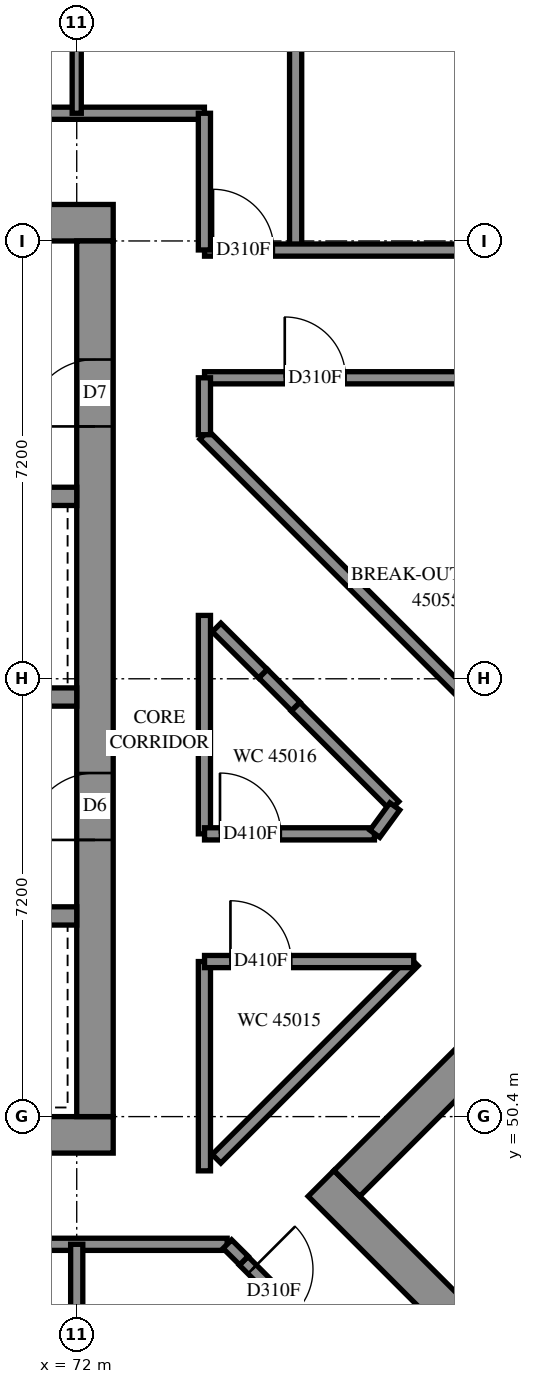
"""IFC4 building model, lengths in metres.
Left out: names, types, materials, properties, quantities, classifications, styles, units other than length and angle.
Written with IfcOpenShell. Run it as: python <this file> out.ifc"""

import sys

from ifc_helpers import new_model, si_unit, direction, frame, frame_2d, origin, place, context, subcontext, project, spatial, rectangle, extrude, element, fill, save


model = new_model("IFC4")
c1 = context("Model", 3, precision=1e-05, world=origin(), true_north=direction((0.0, 1.0)))
c2 = subcontext(c1, "Body", "Model", "MODEL_VIEW")
j1 = project(units=[si_unit("LENGTHUNIT", "METRE"), si_unit("PLANEANGLEUNIT", "RADIAN")], contexts=[c1])
p1 = place(None, origin())
s1 = spatial("IfcSite", under=j1, at=p1, CompositionType="ELEMENT")
p2 = place(p1, origin())
s2 = spatial("IfcBuilding", under=s1, at=p2, CompositionType="ELEMENT")
p3 = place(p2, frame((0.0, 0.0, 166.0)))
s3 = spatial("IfcBuildingStorey", under=s2, at=p3, CompositionType="ELEMENT", Elevation=166.0)
p4 = place(p3, frame((57.0, 50.1, -0.3), z_axis=(0.0, 0.0, 1.0), x_axis=(1.0, 0.0, 0.0)))
e1 = element("IfcWall", 1, at=p4, inside=s3, PredefinedType="SHEAR", context=c2, shape_type="SweptSolid", body=[
    extrude(rectangle(XDim=15.6, YDim=0.6, at=frame_2d((7.8, 0.0))), origin(), (0.0, 0.0, 1.0), 2.7),
])
p5 = place(p3, frame((57.0, 65.1, -0.3), z_axis=(0.0, 0.0, 1.0), x_axis=(1.0, 0.0, 0.0)))
e2 = element("IfcWall", 2, at=p5, inside=s3, PredefinedType="SHEAR", context=c2, shape_type="SweptSolid", body=[
    extrude(rectangle(XDim=15.6, YDim=0.6, at=frame_2d((7.8, 0.0))), origin(), (0.0, 0.0, 1.0), 2.7),
])
p6 = place(p5, frame((10.6, 0.0, 0.3)))
e3 = element("IfcOpeningElement", 3, at=p6, cuts=e2, PredefinedType="OPENING", context=c2, shape_type="SweptSolid", body=[
    extrude(rectangle(XDim=0.8, YDim=2.1, at=frame_2d((0.4, 1.05))), frame((0.0, 0.31, 0.0), z_axis=(0.0, -1.0, 0.0), x_axis=(1.0, 0.0, 0.0)), (0.0, 0.0, 1.0), 0.62),
])
p7 = place(p3, frame((72.3, 50.4, -0.3), z_axis=(0.0, 0.0, 1.0), x_axis=(0.0, 1.0, 0.0)))
e4 = element("IfcWall", 4, at=p7, inside=s3, PredefinedType="SHEAR", context=c2, shape_type="SweptSolid", body=[
    extrude(rectangle(XDim=14.4, YDim=0.6, at=frame_2d((7.2, 0.0))), origin(), (0.0, 0.0, 1.0), 2.7),
])
p8 = place(p7, frame((4.55, 0.0, 0.3)))
e5 = element("IfcOpeningElement", 5, at=p8, cuts=e4, PredefinedType="OPENING", context=c2, shape_type="SweptSolid", body=[
    extrude(rectangle(XDim=1.1, YDim=2.1, at=frame_2d((0.55, 1.05))), frame((0.0, 0.31, 0.0), z_axis=(0.0, -1.0, 0.0), x_axis=(1.0, 0.0, 0.0)), (0.0, 0.0, 1.0), 0.62),
])
p9 = place(p7, frame((11.35, 0.0, 0.3)))
e6 = element("IfcOpeningElement", 6, at=p9, cuts=e4, PredefinedType="OPENING", context=c2, shape_type="SweptSolid", body=[
    extrude(rectangle(XDim=1.1, YDim=2.1, at=frame_2d((0.55, 1.05))), frame((0.0, 0.31, 0.0), z_axis=(0.0, -1.0, 0.0), x_axis=(1.0, 0.0, 0.0)), (0.0, 0.0, 1.0), 0.62),
])
p10 = place(p3, frame((57.6, 53.7, 0.0), z_axis=(0.0, 0.0, 1.0), x_axis=(1.0, 0.0, 0.0)))
e7 = element("IfcWall", 7, at=p10, inside=s3, PredefinedType="SOLIDWALL", context=c2, shape_type="SweptSolid", body=[
    extrude(rectangle(XDim=14.4, YDim=0.3, at=frame_2d((7.2, 0.0))), origin(), (0.0, 0.0, 1.0), 3.1),
])
p11 = place(p10, frame((1.35, 0.0, 0.0)))
e8 = element("IfcOpeningElement", 8, at=p11, cuts=e7, PredefinedType="OPENING", context=c2, shape_type="SweptSolid", body=[
    extrude(rectangle(XDim=0.9, YDim=2.1, at=frame_2d((0.45, 1.05))), frame((0.0, 0.16, 0.0), z_axis=(0.0, -1.0, 0.0), x_axis=(1.0, 0.0, 0.0)), (0.0, 0.0, 1.0), 0.32),
])
p12 = place(p10, frame((4.95, 0.0, 0.0)))
e9 = element("IfcOpeningElement", 9, at=p12, cuts=e7, PredefinedType="OPENING", context=c2, shape_type="SweptSolid", body=[
    extrude(rectangle(XDim=0.9, YDim=2.1, at=frame_2d((0.45, 1.05))), frame((0.0, 0.16, 0.0), z_axis=(0.0, -1.0, 0.0), x_axis=(1.0, 0.0, 0.0)), (0.0, 0.0, 1.0), 0.32),
])
p13 = place(p10, frame((8.55, 0.0, 0.0)))
e10 = element("IfcOpeningElement", 10, at=p13, cuts=e7, PredefinedType="OPENING", context=c2, shape_type="SweptSolid", body=[
    extrude(rectangle(XDim=0.9, YDim=2.1, at=frame_2d((0.45, 1.05))), frame((0.0, 0.16, 0.0), z_axis=(0.0, -1.0, 0.0), x_axis=(1.0, 0.0, 0.0)), (0.0, 0.0, 1.0), 0.32),
])
p14 = place(p10, frame((12.05, 0.0, 0.0)))
e11 = element("IfcOpeningElement", 11, at=p14, cuts=e7, PredefinedType="OPENING", context=c2, shape_type="SweptSolid", body=[
    extrude(rectangle(XDim=1.1, YDim=2.1, at=frame_2d((0.55, 1.05))), frame((0.0, 0.16, 0.0), z_axis=(0.0, -1.0, 0.0), x_axis=(1.0, 0.0, 0.0)), (0.0, 0.0, 1.0), 0.32),
])
p15 = place(p3, frame((57.6, 57.3, 0.0), z_axis=(0.0, 0.0, 1.0), x_axis=(1.0, 0.0, 0.0)))
e12 = element("IfcWall", 12, at=p15, inside=s3, PredefinedType="SOLIDWALL", context=c2, shape_type="SweptSolid", body=[
    extrude(rectangle(XDim=14.4, YDim=0.3, at=frame_2d((7.2, 0.0))), origin(), (0.0, 0.0, 1.0), 3.1),
])
p16 = place(p15, frame((1.25, 0.0, 0.0)))
e13 = element("IfcOpeningElement", 13, at=p16, cuts=e12, PredefinedType="OPENING", context=c2, shape_type="SweptSolid", body=[
    extrude(rectangle(XDim=1.1, YDim=2.1, at=frame_2d((0.55, 1.05))), frame((0.0, 0.16, 0.0), z_axis=(0.0, -1.0, 0.0), x_axis=(1.0, 0.0, 0.0)), (0.0, 0.0, 1.0), 0.32),
])
p17 = place(p15, frame((4.85, 0.0, 0.0)))
e14 = element("IfcOpeningElement", 14, at=p17, cuts=e12, PredefinedType="OPENING", context=c2, shape_type="SweptSolid", body=[
    extrude(rectangle(XDim=1.1, YDim=2.1, at=frame_2d((0.55, 1.05))), frame((0.0, 0.16, 0.0), z_axis=(0.0, -1.0, 0.0), x_axis=(1.0, 0.0, 0.0)), (0.0, 0.0, 1.0), 0.32),
])
p18 = place(p15, frame((8.45, 0.0, 0.0)))
e15 = element("IfcOpeningElement", 15, at=p18, cuts=e12, PredefinedType="OPENING", context=c2, shape_type="SweptSolid", body=[
    extrude(rectangle(XDim=1.1, YDim=2.1, at=frame_2d((0.55, 1.05))), frame((0.0, 0.16, 0.0), z_axis=(0.0, -1.0, 0.0), x_axis=(1.0, 0.0, 0.0)), (0.0, 0.0, 1.0), 0.32),
])
p19 = place(p15, frame((12.05, 0.0, 0.0)))
e16 = element("IfcOpeningElement", 16, at=p19, cuts=e12, PredefinedType="OPENING", context=c2, shape_type="SweptSolid", body=[
    extrude(rectangle(XDim=1.1, YDim=2.1, at=frame_2d((0.55, 1.05))), frame((0.0, 0.16, 0.0), z_axis=(0.0, -1.0, 0.0), x_axis=(1.0, 0.0, 0.0)), (0.0, 0.0, 1.0), 0.32),
])
p20 = place(p3, frame((64.8, 60.6, 0.0), z_axis=(0.0, 0.0, 1.0), x_axis=(1.0, 0.0, 0.0)))
e17 = element("IfcWall", 17, at=p20, inside=s3, PredefinedType="SOLIDWALL", context=c2, shape_type="SweptSolid", body=[
    extrude(rectangle(XDim=7.2, YDim=0.3, at=frame_2d((3.6, 0.0))), origin(), (0.0, 0.0, 1.0), 3.1),
])
p21 = place(p3, frame((76.018, 49.302, -0.3), z_axis=(0.0, 0.0, 1.0), x_axis=(0.7071067812, -0.7071067812, 0.0)))
e18 = element("IfcWall", 18, at=p21, inside=s3, PredefinedType="SHEAR", context=c2, shape_type="SweptSolid", body=[
    extrude(rectangle(XDim=15.6, YDim=0.6, at=frame_2d((7.8, 0.0))), origin(), (0.0, 0.0, 1.0), 2.7),
])
p22 = place(p3, frame((76.442, 49.302, -0.3), z_axis=(0.0, 0.0, 1.0), x_axis=(0.7071067812, 0.7071067812, 0.0)))
e19 = element("IfcWall", 19, at=p22, inside=s3, PredefinedType="SHEAR", context=c2, shape_type="SweptSolid", body=[
    extrude(rectangle(XDim=14.4, YDim=0.6, at=frame_2d((7.2, 0.0))), origin(), (0.0, 0.0, 1.0), 2.7),
])
p23 = place(p22, frame((4.55, 0.0, 0.3)))
e20 = element("IfcOpeningElement", 20, at=p23, cuts=e19, PredefinedType="OPENING", context=c2, shape_type="SweptSolid", body=[
    extrude(rectangle(XDim=1.1, YDim=2.1, at=frame_2d((0.55, 1.05))), frame((0.0, 0.31, 0.0), z_axis=(0.0, -1.0, 0.0), x_axis=(1.0, 0.0, 0.0)), (0.0, 0.0, 1.0), 0.62),
])
p24 = place(p22, frame((11.35, 0.0, 0.3)))
e21 = element("IfcOpeningElement", 21, at=p24, cuts=e19, PredefinedType="OPENING", context=c2, shape_type="SweptSolid", body=[
    extrude(rectangle(XDim=1.1, YDim=2.1, at=frame_2d((0.55, 1.05))), frame((0.0, 0.31, 0.0), z_axis=(0.0, -1.0, 0.0), x_axis=(1.0, 0.0, 0.0)), (0.0, 0.0, 1.0), 0.62),
])
p25 = place(p3, frame((55.5, 48.3, 0.0), z_axis=(0.0, 0.0, 1.0), x_axis=(1.0, 0.0, 0.0)))
e22 = element("IfcWall", 22, at=p25, inside=s3, PredefinedType="PARTITIONING", context=c2, shape_type="SweptSolid", body=[
    extrude(rectangle(XDim=18.974, YDim=0.2, at=frame_2d((9.487, 0.0))), origin(), (0.0, 0.0, 1.0), 3.1),
])
p26 = place(p25, frame((5.963, 0.0, 0.0)))
e23 = element("IfcOpeningElement", 23, at=p26, cuts=e22, PredefinedType="OPENING", context=c2, shape_type="SweptSolid", body=[
    extrude(rectangle(XDim=1.0, YDim=2.1, at=frame_2d((0.5, 1.05))), frame((0.0, 0.11, 0.0), z_axis=(0.0, -1.0, 0.0), x_axis=(1.0, 0.0, 0.0)), (0.0, 0.0, 1.0), 0.22),
])
p27 = place(p25, frame((13.161, 0.0, 0.0)))
e24 = element("IfcOpeningElement", 24, at=p27, cuts=e22, PredefinedType="OPENING", context=c2, shape_type="SweptSolid", body=[
    extrude(rectangle(XDim=0.9, YDim=2.1, at=frame_2d((0.45, 1.05))), frame((0.0, 0.11, 0.0), z_axis=(0.0, -1.0, 0.0), x_axis=(1.0, 0.0, 0.0)), (0.0, 0.0, 1.0), 0.22),
])
p28 = place(p3, frame((55.5, 66.9, 0.0), z_axis=(0.0, 0.0, 1.0), x_axis=(1.0, 0.0, 0.0)))
e25 = element("IfcWall", 25, at=p28, inside=s3, PredefinedType="PARTITIONING", context=c2, shape_type="SweptSolid", body=[
    extrude(rectangle(XDim=18.6, YDim=0.2, at=frame_2d((9.3, 0.0))), origin(), (0.0, 0.0, 1.0), 3.1),
])
p29 = place(p28, frame((4.45, 0.0, 0.0)))
e26 = element("IfcOpeningElement", 26, at=p29, cuts=e25, PredefinedType="OPENING", context=c2, shape_type="SweptSolid", body=[
    extrude(rectangle(XDim=0.9, YDim=2.1, at=frame_2d((0.45, 1.05))), frame((0.0, 0.11, 0.0), z_axis=(0.0, -1.0, 0.0), x_axis=(1.0, 0.0, 0.0)), (0.0, 0.0, 1.0), 0.22),
])
p30 = place(p28, frame((6.1, 0.0, 0.0)))
e27 = element("IfcOpeningElement", 27, at=p30, cuts=e25, PredefinedType="OPENING", context=c2, shape_type="SweptSolid", body=[
    extrude(rectangle(XDim=0.9, YDim=2.1, at=frame_2d((0.45, 1.05))), frame((0.0, 0.11, 0.0), z_axis=(0.0, -1.0, 0.0), x_axis=(1.0, 0.0, 0.0)), (0.0, 0.0, 1.0), 0.22),
])
p31 = place(p28, frame((11.65, 0.0, 0.0)))
e28 = element("IfcOpeningElement", 28, at=p31, cuts=e25, PredefinedType="OPENING", context=c2, shape_type="SweptSolid", body=[
    extrude(rectangle(XDim=0.9, YDim=2.1, at=frame_2d((0.45, 1.05))), frame((0.0, 0.11, 0.0), z_axis=(0.0, -1.0, 0.0), x_axis=(1.0, 0.0, 0.0)), (0.0, 0.0, 1.0), 0.22),
])
p32 = place(p28, frame((13.3, 0.0, 0.0)))
e29 = element("IfcOpeningElement", 29, at=p32, cuts=e25, PredefinedType="OPENING", context=c2, shape_type="SweptSolid", body=[
    extrude(rectangle(XDim=0.9, YDim=2.1, at=frame_2d((0.45, 1.05))), frame((0.0, 0.11, 0.0), z_axis=(0.0, -1.0, 0.0), x_axis=(1.0, 0.0, 0.0)), (0.0, 0.0, 1.0), 0.22),
])
p33 = place(p3, frame((75.6, 64.65, 0.0), z_axis=(0.0, 0.0, 1.0), x_axis=(0.0, 1.0, 0.0)))
e30 = element("IfcWall", 30, at=p33, inside=s3, PredefinedType="PARTITIONING", context=c2, shape_type="SweptSolid", body=[
    extrude(rectangle(XDim=8.16, YDim=0.2, at=frame_2d((4.08, 0.0))), origin(), (0.0, 0.0, 1.0), 3.1),
])
p34 = place(p3, frame((74.097, 61.611, 0.0), z_axis=(0.0, 0.0, 1.0), x_axis=(0.7071067812, -0.7071067812, 0.0)))
e31 = element("IfcWall", 31, at=p34, inside=s3, PredefinedType="PARTITIONING", context=c2, shape_type="SweptSolid", body=[
    extrude(rectangle(XDim=8.061, YDim=0.2, at=frame_2d((4.03, 0.0))), origin(), (0.0, 0.0, 1.0), 3.1),
])
p35 = place(p3, frame((74.102, 62.55, 0.0), z_axis=(0.0, 0.0, 1.0), x_axis=(1.0, 0.0, 0.0)))
e32 = element("IfcWall", 32, at=p35, inside=s3, PredefinedType="PARTITIONING", context=c2, shape_type="SweptSolid", body=[
    extrude(rectangle(XDim=5.098, YDim=0.2, at=frame_2d((2.549, 0.0))), origin(), (0.0, 0.0, 1.0), 3.1),
])
p36 = place(p35, frame((1.319, 0.0, 0.0)))
e33 = element("IfcOpeningElement", 33, at=p36, cuts=e32, PredefinedType="OPENING", context=c2, shape_type="SweptSolid", body=[
    extrude(rectangle(XDim=1.0, YDim=2.1, at=frame_2d((0.5, 1.05))), frame((0.0, 0.11, 0.0), z_axis=(0.0, -1.0, 0.0), x_axis=(1.0, 0.0, 0.0)), (0.0, 0.0, 1.0), 0.22),
])
p37 = place(p3, frame((72.0, 43.65, 0.0), z_axis=(0.0, 0.0, 1.0), x_axis=(0.0, 1.0, 0.0)))
e34 = element("IfcWall", 34, at=p37, inside=s3, PredefinedType="PARTITIONING", context=c2, shape_type="SweptSolid", body=[
    extrude(rectangle(XDim=4.65, YDim=0.2, at=frame_2d((2.325, 0.0))), origin(), (0.0, 0.0, 1.0), 3.1),
])
p38 = place(p3, frame((74.102, 64.65, 0.0), z_axis=(0.0, 0.0, 1.0), x_axis=(1.0, 0.0, 0.0)))
e35 = element("IfcWall", 35, at=p38, inside=s3, PredefinedType="PARTITIONING", context=c2, shape_type="SweptSolid", body=[
    extrude(rectangle(XDim=4.648, YDim=0.2, at=frame_2d((2.324, 0.0))), origin(), (0.0, 0.0, 1.0), 3.1),
])
p39 = place(p38, frame((0.14, 0.0, 0.0)))
e36 = element("IfcOpeningElement", 36, at=p39, cuts=e35, PredefinedType="OPENING", context=c2, shape_type="SweptSolid", body=[
    extrude(rectangle(XDim=1.0, YDim=2.1, at=frame_2d((0.5, 1.05))), frame((0.0, 0.11, 0.0), z_axis=(0.0, -1.0, 0.0), x_axis=(1.0, 0.0, 0.0)), (0.0, 0.0, 1.0), 0.22),
])
p40 = place(p3, frame((74.3, 49.706, 0.0), z_axis=(0.0, 0.0, 1.0), x_axis=(0.7071067812, 0.7071067812, 0.0)))
e37 = element("IfcWall", 37, at=p40, inside=s3, PredefinedType="PARTITIONING", context=c2, shape_type="SweptSolid", body=[
    extrude(rectangle(XDim=4.588, YDim=0.2, at=frame_2d((2.294, 0.0))), origin(), (0.0, 0.0, 1.0), 3.1),
])
p41 = place(p3, frame((74.745, 48.029, 0.0), z_axis=(0.0, 0.0, 1.0), x_axis=(0.7068806156, -0.7073328745, 0.0)))
e38 = element("IfcWall", 38, at=p41, inside=s3, PredefinedType="PARTITIONING", context=c2, shape_type="SweptSolid", body=[
    extrude(rectangle(XDim=4.422, YDim=0.2, at=frame_2d((2.211, 0.0))), origin(), (0.0, 0.0, 1.0), 3.1),
])
p42 = place(p41, frame((0.199, 0.0, 0.0)))
e39 = element("IfcOpeningElement", 39, at=p42, cuts=e38, PredefinedType="OPENING", context=c2, shape_type="SweptSolid", body=[
    extrude(rectangle(XDim=1.0, YDim=2.1, at=frame_2d((0.5, 1.05))), frame((0.0, 0.11, 0.0), z_axis=(0.0, -1.0, 0.0), x_axis=(1.0, 0.0, 0.0)), (0.0, 0.0, 1.0), 0.22),
])
p43 = place(p3, frame((74.1, 55.05, 0.0), z_axis=(0.0, 0.0, 1.0), x_axis=(0.0, 1.0, 0.0)))
e40 = element("IfcWall", 40, at=p43, inside=s3, PredefinedType="PARTITIONING", context=c2, shape_type="SweptSolid", body=[
    extrude(rectangle(XDim=3.592, YDim=0.2, at=frame_2d((1.796, 0.0))), origin(), (0.0, 0.0, 1.0), 3.1),
])
p44 = place(p3, frame((74.1, 49.508, 0.0), z_axis=(0.0, 0.0, 1.0), x_axis=(0.0, 1.0, 0.0)))
e41 = element("IfcWall", 41, at=p44, inside=s3, PredefinedType="PARTITIONING", context=c2, shape_type="SweptSolid", body=[
    extrude(rectangle(XDim=3.442, YDim=0.2, at=frame_2d((1.721, 0.0))), origin(), (0.0, 0.0, 1.0), 3.1),
])
p45 = place(p3, frame((74.102, 52.95, 0.0), z_axis=(0.0, 0.0, 1.0), x_axis=(1.0, 0.0, 0.0)))
e42 = element("IfcWall", 42, at=p45, inside=s3, PredefinedType="PARTITIONING", context=c2, shape_type="SweptSolid", body=[
    extrude(rectangle(XDim=3.44, YDim=0.2, at=frame_2d((1.72, 0.0))), origin(), (0.0, 0.0, 1.0), 3.1),
])
p46 = place(p45, frame((0.426, 0.0, 0.0)))
e43 = element("IfcOpeningElement", 43, at=p46, cuts=e42, PredefinedType="OPENING", context=c2, shape_type="SweptSolid", body=[
    extrude(rectangle(XDim=1.0, YDim=2.1, at=frame_2d((0.5, 1.05))), frame((0.0, 0.11, 0.0), z_axis=(0.0, -1.0, 0.0), x_axis=(1.0, 0.0, 0.0)), (0.0, 0.0, 1.0), 0.22),
])
p47 = place(p3, frame((74.102, 55.05, 0.0), z_axis=(0.0, 0.0, 1.0), x_axis=(1.0, 0.0, 0.0)))
e44 = element("IfcWall", 44, at=p47, inside=s3, PredefinedType="PARTITIONING", context=c2, shape_type="SweptSolid", body=[
    extrude(rectangle(XDim=2.794, YDim=0.2, at=frame_2d((1.397, 0.0))), origin(), (0.0, 0.0, 1.0), 3.1),
])
p48 = place(p47, frame((0.254, 0.0, 0.0)))
e45 = element("IfcOpeningElement", 45, at=p48, cuts=e44, PredefinedType="OPENING", context=c2, shape_type="SweptSolid", body=[
    extrude(rectangle(XDim=1.0, YDim=2.1, at=frame_2d((0.5, 1.05))), frame((0.0, 0.11, 0.0), z_axis=(0.0, -1.0, 0.0), x_axis=(1.0, 0.0, 0.0)), (0.0, 0.0, 1.0), 0.22),
])
p49 = place(p3, frame((72.0, 66.9, 0.0), z_axis=(0.0, 0.0, 1.0), x_axis=(0.0, 1.0, 0.0)))
e46 = element("IfcWall", 46, at=p49, inside=s3, PredefinedType="PARTITIONING", context=c2, shape_type="SweptSolid", body=[
    extrude(rectangle(XDim=2.4, YDim=0.15, at=frame_2d((1.2, 0.0))), origin(), (0.0, 0.0, 1.0), 3.1),
])
p50 = place(p3, frame((75.597, 57.141, 0.0), z_axis=(0.0, 0.0, 1.0), x_axis=(0.7071067812, -0.7071067812, 0.0)))
e47 = element("IfcWall", 47, at=p50, inside=s3, PredefinedType="PARTITIONING", context=c2, shape_type="SweptSolid", body=[
    extrude(rectangle(XDim=2.305, YDim=0.2, at=frame_2d((1.153, 0.0))), origin(), (0.0, 0.0, 1.0), 3.1),
])
p51 = place(p3, frame((74.1, 64.652, 0.0), z_axis=(0.0, 0.0, 1.0), x_axis=(0.0, 1.0, 0.0)))
e48 = element("IfcWall", 48, at=p51, inside=s3, PredefinedType="PARTITIONING", context=c2, shape_type="SweptSolid", body=[
    extrude(rectangle(XDim=2.248, YDim=0.2, at=frame_2d((1.124, 0.0))), origin(), (0.0, 0.0, 1.0), 3.1),
])
p52 = place(p3, frame((74.3, 58.444, 0.0), z_axis=(0.0, 0.0, 1.0), x_axis=(0.7080329185, -0.7061794292, 0.0)))
e49 = element("IfcWall", 49, at=p52, inside=s3, PredefinedType="PARTITIONING", context=c2, shape_type="SweptSolid", body=[
    extrude(rectangle(XDim=1.079, YDim=0.2, at=frame_2d((0.539, 0.0))), origin(), (0.0, 0.0, 1.0), 3.1),
])
p53 = place(p3, frame((74.1, 61.614, 0.0), z_axis=(0.0, 0.0, 1.0), x_axis=(0.0, 1.0, 0.0)))
e50 = element("IfcWall", 50, at=p53, inside=s3, PredefinedType="PARTITIONING", context=c2, shape_type="SweptSolid", body=[
    extrude(rectangle(XDim=0.936, YDim=0.2, at=frame_2d((0.468, 0.0))), origin(), (0.0, 0.0, 1.0), 3.1),
])
p54 = place(p3, frame((75.065, 57.683, 0.0), z_axis=(0.0, 0.0, 1.0), x_axis=(0.705788785, -0.7084223253, 0.0)))
e51 = element("IfcWall", 51, at=p54, inside=s3, PredefinedType="PARTITIONING", context=c2, shape_type="SweptSolid", body=[
    extrude(rectangle(XDim=0.759, YDim=0.2, at=frame_2d((0.38, 0.0))), origin(), (0.0, 0.0, 1.0), 3.1),
])
p55 = place(p3, frame((76.903, 55.051, 0.0), z_axis=(0.0, 0.0, 1.0), x_axis=(0.5890255926, 0.8081143801, 0.0)))
e52 = element("IfcWall", 52, at=p55, inside=s3, PredefinedType="PARTITIONING", context=c2, shape_type="SweptSolid", body=[
    extrude(rectangle(XDim=0.557, YDim=0.2, at=frame_2d((0.278, 0.0))), origin(), (0.0, 0.0, 1.0), 3.1),
])
p56 = place(p3, frame((74.477, 48.303, 0.0), z_axis=(0.0, 0.0, 1.0), x_axis=(0.7097111995, -0.7044927348, 0.0)))
e53 = element("IfcWall", 53, at=p56, inside=s3, PredefinedType="PARTITIONING", context=c2, shape_type="SweptSolid", body=[
    extrude(rectangle(XDim=0.383, YDim=0.2, at=frame_2d((0.192, 0.0))), origin(), (0.0, 0.0, 1.0), 3.1),
])
p57 = place(p8, origin())
e54 = element("IfcDoor", 54, at=p57, inside=s3, OperationType="DOUBLE_DOOR_SINGLE_SWING", PredefinedType="DOOR", context=c2, shape_type="SweptSolid", body=[
    extrude(rectangle(XDim=1.1, YDim=2.1, at=frame_2d((0.55, 1.05))), frame((0.0, 0.025, 0.0), z_axis=(0.0, -1.0, 0.0), x_axis=(1.0, 0.0, 0.0)), (0.0, 0.0, 1.0), 0.05),
])
fill(e5, e54)
p58 = place(p9, origin())
e55 = element("IfcDoor", 55, at=p58, inside=s3, OperationType="SINGLE_SWING_RIGHT", PredefinedType="DOOR", context=c2, shape_type="SweptSolid", body=[
    extrude(rectangle(XDim=1.1, YDim=2.1, at=frame_2d((0.55, 1.05))), frame((0.0, 0.025, 0.0), z_axis=(0.0, -1.0, 0.0), x_axis=(1.0, 0.0, 0.0)), (0.0, 0.0, 1.0), 0.05),
])
fill(e6, e55)
p59 = place(p46, origin())
e56 = element("IfcDoor", 56, at=p59, inside=s3, OperationType="SINGLE_SWING_RIGHT", PredefinedType="DOOR", context=c2, shape_type="SweptSolid", body=[
    extrude(rectangle(XDim=1.0, YDim=2.1, at=frame_2d((0.5, 1.05))), frame((0.0, 0.025, 0.0), z_axis=(0.0, -1.0, 0.0), x_axis=(1.0, 0.0, 0.0)), (0.0, 0.0, 1.0), 0.05),
])
fill(e43, e56)
p60 = place(p48, origin())
e57 = element("IfcDoor", 57, at=p60, inside=s3, OperationType="SINGLE_SWING_LEFT", PredefinedType="DOOR", context=c2, shape_type="SweptSolid", body=[
    extrude(rectangle(XDim=1.0, YDim=2.1, at=frame_2d((0.5, 1.05))), frame((0.0, 0.025, 0.0), z_axis=(0.0, -1.0, 0.0), x_axis=(1.0, 0.0, 0.0)), (0.0, 0.0, 1.0), 0.05),
])
fill(e45, e57)
p61 = place(p39, origin())
e58 = element("IfcDoor", 58, at=p61, inside=s3, OperationType="SINGLE_SWING_RIGHT", PredefinedType="DOOR", context=c2, shape_type="SweptSolid", body=[
    extrude(rectangle(XDim=1.0, YDim=2.1, at=frame_2d((0.5, 1.05))), frame((0.0, 0.025, 0.0), z_axis=(0.0, -1.0, 0.0), x_axis=(1.0, 0.0, 0.0)), (0.0, 0.0, 1.0), 0.05),
])
fill(e36, e58)
p62 = place(p42, origin())
e59 = element("IfcDoor", 59, at=p62, inside=s3, OperationType="SINGLE_SWING_LEFT", PredefinedType="DOOR", context=c2, shape_type="SweptSolid", body=[
    extrude(rectangle(XDim=1.0, YDim=2.1, at=frame_2d((0.5, 1.05))), frame((0.0, 0.025, 0.0), z_axis=(0.0, -1.0, 0.0), x_axis=(1.0, 0.0, 0.0)), (0.0, 0.0, 1.0), 0.05),
])
fill(e39, e59)
p63 = place(p36, origin())
e60 = element("IfcDoor", 60, at=p63, inside=s3, OperationType="SINGLE_SWING_RIGHT", PredefinedType="DOOR", context=c2, shape_type="SweptSolid", body=[
    extrude(rectangle(XDim=1.0, YDim=2.1, at=frame_2d((0.5, 1.05))), frame((0.0, 0.025, 0.0), z_axis=(0.0, -1.0, 0.0), x_axis=(1.0, 0.0, 0.0)), (0.0, 0.0, 1.0), 0.05),
])
fill(e33, e60)
save(model, sys.argv[1])
